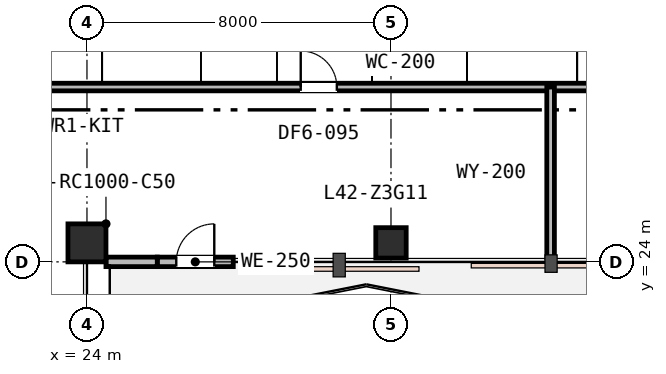
"""IFC4 building model, lengths in metres.
Left out: names, types, materials, properties, quantities, classifications, styles, units other than length and angle.
Written with IfcOpenShell. Run it as: python <this file> out.ifc"""

import sys

from ifc_helpers import new_model, si_unit, direction, frame, frame_2d, origin, origin_2d, place, context, subcontext, project, spatial, rectangle, extrude, element, fill, save


model = new_model("IFC4")
c1 = context("Model", 3, precision=1e-05, world=origin(), true_north=direction((0.0, 1.0)))
c2 = subcontext(c1, "Body", "Model", "MODEL_VIEW")
j1 = project(units=[si_unit("LENGTHUNIT", "METRE"), si_unit("PLANEANGLEUNIT", "RADIAN")], contexts=[c1])
p1 = place(None, origin())
s1 = spatial("IfcSite", under=j1, at=p1, CompositionType="ELEMENT")
p2 = place(p1, origin())
s2 = spatial("IfcBuilding", under=s1, at=p2, CompositionType="ELEMENT")
p3 = place(p2, frame((0.0, 0.0, 165.0)))
s3 = spatial("IfcBuildingStorey", under=s2, at=p3, CompositionType="ELEMENT", Elevation=165.0)
p4 = place(p3, frame((24.0, 24.5, 0.0), z_axis=(0.0, 0.0, 1.0), x_axis=(1.0, 0.0, 0.0)))
e1 = element("IfcColumn", 1, at=p4, inside=s3, PredefinedType="COLUMN", context=c2, shape_type="SweptSolid", body=[
    extrude(rectangle(XDim=1.0, YDim=1.0, at=origin_2d()), origin(), (0.0, 0.0, 1.0), 3.6),
])
p5 = place(p3, frame((32.0, 24.5, 0.0), z_axis=(0.0, 0.0, 1.0), x_axis=(1.0, 0.0, 0.0)))
e2 = element("IfcColumn", 2, at=p5, inside=s3, PredefinedType="COLUMN", context=c2, shape_type="SweptSolid", body=[
    extrude(rectangle(XDim=0.8, YDim=0.8, at=origin_2d()), origin(), (0.0, 0.0, 1.0), 3.6),
])
p6 = place(p3, frame((25.85, 24.0, 0.0), z_axis=(0.0, 0.0, 1.0), x_axis=(1.0, 0.0, 0.0)))
e3 = element("IfcWall", 3, at=p6, inside=s3, PredefinedType="STANDARD", context=c2, shape_type="SweptSolid", body=[
    extrude(rectangle(XDim=2.0, YDim=0.25, at=frame_2d((1.0, 0.0))), origin(), (0.0, 0.0, 1.0), 3.01),
])
p7 = place(p6, frame((0.5, 0.0, 0.0)))
e4 = element("IfcOpeningElement", 4, at=p7, cuts=e3, PredefinedType="OPENING", context=c2, shape_type="SweptSolid", body=[
    extrude(rectangle(XDim=1.0, YDim=2.15, at=frame_2d((0.5, 1.075))), frame((0.0, 0.135, 0.0), z_axis=(0.0, -1.0, 0.0), x_axis=(1.0, 0.0, 0.0)), (0.0, 0.0, 1.0), 0.27),
])
p8 = place(p3, frame((24.5, 24.0, 0.0), z_axis=(0.0, 0.0, 1.0), x_axis=(1.0, 0.0, 0.0)))
e5 = element("IfcWall", 5, at=p8, inside=s3, PredefinedType="STANDARD", context=c2, shape_type="SweptSolid", body=[
    extrude(rectangle(XDim=1.35, YDim=0.25, at=frame_2d((0.675, 0.0))), origin(), (0.0, 0.0, 1.0), 3.01),
])
p9 = place(p3, frame((13.6, 28.6, 0.0), z_axis=(0.0, 0.0, 1.0), x_axis=(1.0, 0.0, 0.0)))
e6 = element("IfcWall", 6, at=p9, inside=s3, PredefinedType="PARTITIONING", context=c2, shape_type="SweptSolid", body=[
    extrude(rectangle(XDim=37.3, YDim=0.2, at=frame_2d((18.65, 0.0))), origin(), (0.0, 0.0, 1.0), 2.93),
])
p10 = place(p9, frame((16.025, 0.0, 0.0)))
e7 = element("IfcOpeningElement", 7, at=p10, cuts=e6, PredefinedType="OPENING", context=c2, shape_type="SweptSolid", body=[
    extrude(rectangle(XDim=0.95, YDim=2.15, at=frame_2d((0.475, 1.075))), frame((0.0, 0.11, 0.0), z_axis=(0.0, -1.0, 0.0), x_axis=(1.0, 0.0, 0.0)), (0.0, 0.0, 1.0), 0.22),
])
p11 = place(p9, frame((25.925, 0.0, 0.0)))
e8 = element("IfcOpeningElement", 8, at=p11, cuts=e6, PredefinedType="OPENING", context=c2, shape_type="SweptSolid", body=[
    extrude(rectangle(XDim=0.95, YDim=2.15, at=frame_2d((0.475, 1.075))), frame((0.0, 0.11, 0.0), z_axis=(0.0, -1.0, 0.0), x_axis=(1.0, 0.0, 0.0)), (0.0, 0.0, 1.0), 0.22),
])
p12 = place(p3, frame((36.2, 24.1, 0.0), z_axis=(0.0, 0.0, 1.0), x_axis=(0.0, 1.0, 0.0)))
e9 = element("IfcWall", 9, at=p12, inside=s3, PredefinedType="PARTITIONING", context=c2, shape_type="SweptSolid", body=[
    extrude(rectangle(XDim=4.5, YDim=0.2, at=frame_2d((2.25, 0.0))), origin(), (0.0, 0.0, 1.0), 3.01),
])
p13 = place(p7, origin())
e10 = element("IfcDoor", 10, at=p13, inside=s3, OperationType="SINGLE_SWING_RIGHT", PredefinedType="DOOR", context=c2, shape_type="SweptSolid", body=[
    extrude(rectangle(XDim=1.0, YDim=2.15, at=frame_2d((0.5, 1.075))), frame((0.0, 0.025, 0.0), z_axis=(0.0, -1.0, 0.0), x_axis=(1.0, 0.0, 0.0)), (0.0, 0.0, 1.0), 0.05),
])
fill(e4, e10)
p14 = place(p10, origin())
e11 = element("IfcDoor", 11, at=p14, inside=s3, OperationType="SINGLE_SWING_LEFT", PredefinedType="DOOR", context=c2, shape_type="SweptSolid", body=[
    extrude(rectangle(XDim=0.95, YDim=2.15, at=frame_2d((0.475, 1.075))), frame((0.0, 0.025, 0.0), z_axis=(0.0, -1.0, 0.0), x_axis=(1.0, 0.0, 0.0)), (0.0, 0.0, 1.0), 0.05),
])
fill(e7, e11)
save(model, sys.argv[1])
